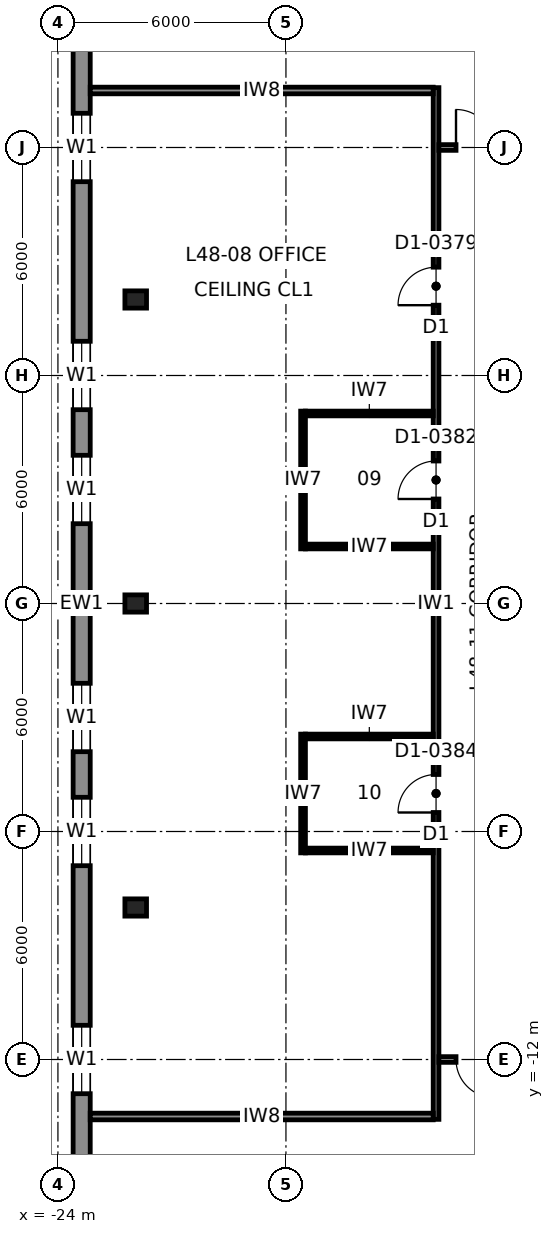
"""IFC4 building model, lengths in metres.
Left out: names, types, materials, properties, quantities, classifications, styles, units other than length and angle.
Written with IfcOpenShell. Run it as: python <this file> out.ifc"""

import sys

from ifc_helpers import new_model, si_unit, direction, frame, frame_2d, origin, origin_2d, place, context, subcontext, project, spatial, rectangle, i_section, extrude, element, fill, save


model = new_model("IFC4")
c1 = context("Model", 3, precision=1e-05, world=origin(), true_north=direction((0.0, 1.0)))
c2 = subcontext(c1, "Body", "Model", "MODEL_VIEW")
j1 = project(units=[si_unit("LENGTHUNIT", "METRE"), si_unit("PLANEANGLEUNIT", "RADIAN")], contexts=[c1])
p1 = place(None, origin())
s1 = spatial("IfcSite", under=j1, at=p1, CompositionType="ELEMENT")
p2 = place(p1, origin())
s2 = spatial("IfcBuilding", under=s1, at=p2, CompositionType="ELEMENT")
p3 = place(p2, frame((0.0, 0.0, 221.8)))
s3 = spatial("IfcBuildingStorey", under=s2, at=p3, CompositionType="ELEMENT", Elevation=221.8)
for number, where, z_axis, x_axis in (
    (1, (-21.953, 0.0, 0.0), (0.04, 0.0, 0.999), (0.0, 1.0, 0.0)),
    (2, (-21.953, 8.0, 0.0), (0.04, 0.0, 0.999), (0.0, 1.0, 0.0)),
    (3, (-21.953, -8.0, 0.0), (0.04, 0.0, 0.999), (0.0, 1.0, 0.0)),
):
    element("IfcColumn", number, at=place(p3, frame(where, z_axis=z_axis, x_axis=x_axis)), inside=s3, PredefinedType="COLUMN", context=c2, shape_type="SweptSolid", body=[
        extrude(i_section(OverallWidth=0.454, OverallDepth=0.569, WebThickness=0.078, FlangeThickness=0.125, at=origin_2d()), origin(), (0.0, 0.0, 1.0), 4.003),
    ])
p4 = place(p3, frame((-23.375, 19.1, 0.0), z_axis=(0.0, 0.0, 1.0), x_axis=(0.0, -1.0, 0.0)))
e4 = element("IfcWall", 4, at=p4, inside=s3, PredefinedType="SOLIDWALL", context=c2, shape_type="SweptSolid", body=[
    extrude(rectangle(XDim=38.2, YDim=0.45, at=frame_2d((19.1, 0.0))), origin(), (0.0, 0.0, 1.0), 3.83),
])
p5 = place(p4, frame((6.2, 0.0, 0.7)))
e5 = element("IfcOpeningElement", 5, at=p5, cuts=e4, PredefinedType="OPENING", context=c2, shape_type="SweptSolid", body=[
    extrude(rectangle(XDim=1.8, YDim=2.6, at=frame_2d((0.9, 1.3))), frame((0.0, 0.235, 0.0), z_axis=(0.0, -1.0, 0.0), x_axis=(1.0, 0.0, 0.0)), (0.0, 0.0, 1.0), 0.47),
])
p6 = place(p4, frame((12.2, 0.0, 0.7)))
e6 = element("IfcOpeningElement", 6, at=p6, cuts=e4, PredefinedType="OPENING", context=c2, shape_type="SweptSolid", body=[
    extrude(rectangle(XDim=1.8, YDim=2.6, at=frame_2d((0.9, 1.3))), frame((0.0, 0.235, 0.0), z_axis=(0.0, -1.0, 0.0), x_axis=(1.0, 0.0, 0.0)), (0.0, 0.0, 1.0), 0.47),
])
p7 = place(p4, frame((15.2, 0.0, 0.7)))
e7 = element("IfcOpeningElement", 7, at=p7, cuts=e4, PredefinedType="OPENING", context=c2, shape_type="SweptSolid", body=[
    extrude(rectangle(XDim=1.8, YDim=2.6, at=frame_2d((0.9, 1.3))), frame((0.0, 0.235, 0.0), z_axis=(0.0, -1.0, 0.0), x_axis=(1.0, 0.0, 0.0)), (0.0, 0.0, 1.0), 0.47),
])
p8 = place(p4, frame((21.2, 0.0, 0.7)))
e8 = element("IfcOpeningElement", 8, at=p8, cuts=e4, PredefinedType="OPENING", context=c2, shape_type="SweptSolid", body=[
    extrude(rectangle(XDim=1.8, YDim=2.6, at=frame_2d((0.9, 1.3))), frame((0.0, 0.235, 0.0), z_axis=(0.0, -1.0, 0.0), x_axis=(1.0, 0.0, 0.0)), (0.0, 0.0, 1.0), 0.47),
])
p9 = place(p4, frame((24.2, 0.0, 0.7)))
e9 = element("IfcOpeningElement", 9, at=p9, cuts=e4, PredefinedType="OPENING", context=c2, shape_type="SweptSolid", body=[
    extrude(rectangle(XDim=1.8, YDim=2.6, at=frame_2d((0.9, 1.3))), frame((0.0, 0.235, 0.0), z_axis=(0.0, -1.0, 0.0), x_axis=(1.0, 0.0, 0.0)), (0.0, 0.0, 1.0), 0.47),
])
p10 = place(p4, frame((30.2, 0.0, 0.7)))
e10 = element("IfcOpeningElement", 10, at=p10, cuts=e4, PredefinedType="OPENING", context=c2, shape_type="SweptSolid", body=[
    extrude(rectangle(XDim=1.8, YDim=2.6, at=frame_2d((0.9, 1.3))), frame((0.0, 0.235, 0.0), z_axis=(0.0, -1.0, 0.0), x_axis=(1.0, 0.0, 0.0)), (0.0, 0.0, 1.0), 0.47),
])
p11 = place(p3, frame((-14.05, 13.575, 0.0), z_axis=(0.0, 0.0, 1.0), x_axis=(0.0, -1.0, 0.0)))
e11 = element("IfcWall", 11, at=p11, inside=s3, PredefinedType="PARTITIONING", context=c2, shape_type="SweptSolid", body=[
    extrude(rectangle(XDim=27.15, YDim=0.15, at=frame_2d((13.575, 0.0))), origin(), (0.0, 0.0, 1.0), 3.83),
])
p12 = place(p11, frame((4.725, 0.0, 0.0)))
e12 = element("IfcOpeningElement", 12, at=p12, cuts=e11, PredefinedType="OPENING", context=c2, shape_type="SweptSolid", body=[
    extrude(rectangle(XDim=1.0, YDim=2.3, at=frame_2d((0.5, 1.15))), frame((0.0, 0.085, 0.0), z_axis=(0.0, -1.0, 0.0), x_axis=(1.0, 0.0, 0.0)), (0.0, 0.0, 1.0), 0.17),
])
p13 = place(p11, frame((9.825, 0.0, 0.0)))
e13 = element("IfcOpeningElement", 13, at=p13, cuts=e11, PredefinedType="OPENING", context=c2, shape_type="SweptSolid", body=[
    extrude(rectangle(XDim=1.0, YDim=2.3, at=frame_2d((0.5, 1.15))), frame((0.0, 0.085, 0.0), z_axis=(0.0, -1.0, 0.0), x_axis=(1.0, 0.0, 0.0)), (0.0, 0.0, 1.0), 0.17),
])
p14 = place(p11, frame((18.075, 0.0, 0.0)))
e14 = element("IfcOpeningElement", 14, at=p14, cuts=e11, PredefinedType="OPENING", context=c2, shape_type="SweptSolid", body=[
    extrude(rectangle(XDim=1.0, YDim=2.3, at=frame_2d((0.5, 1.15))), frame((0.0, 0.085, 0.0), z_axis=(0.0, -1.0, 0.0), x_axis=(1.0, 0.0, 0.0)), (0.0, 0.0, 1.0), 0.17),
])
p15 = place(p3, frame((-13.975, 12.0, 0.0), z_axis=(0.0, 0.0, 1.0), x_axis=(1.0, 0.0, 0.0)))
e15 = element("IfcWall", 15, at=p15, inside=s3, PredefinedType="PARTITIONING", context=c2, shape_type="SweptSolid", body=[
    extrude(rectangle(XDim=1.975, YDim=0.15, at=frame_2d((0.988, 0.0))), origin(), (0.0, 0.0, 1.0), 3.83),
])
p16 = place(p15, frame((0.45, 0.0, 0.0)))
e16 = element("IfcOpeningElement", 16, at=p16, cuts=e15, PredefinedType="OPENING", context=c2, shape_type="SweptSolid", body=[
    extrude(rectangle(XDim=1.0, YDim=2.3, at=frame_2d((0.5, 1.15))), frame((0.0, 0.085, 0.0), z_axis=(0.0, -1.0, 0.0), x_axis=(1.0, 0.0, 0.0)), (0.0, 0.0, 1.0), 0.17),
])
p17 = place(p3, frame((-12.0, -12.0, 0.0), z_axis=(0.0, 0.0, 1.0), x_axis=(-1.0, 0.0, 0.0)))
e17 = element("IfcWall", 17, at=p17, inside=s3, PredefinedType="PARTITIONING", context=c2, shape_type="SweptSolid", body=[
    extrude(rectangle(XDim=1.975, YDim=0.15, at=frame_2d((0.988, 0.0))), origin(), (0.0, 0.0, 1.0), 3.83),
])
p18 = place(p17, frame((0.525, 0.0, 0.0)))
e18 = element("IfcOpeningElement", 18, at=p18, cuts=e17, PredefinedType="OPENING", context=c2, shape_type="SweptSolid", body=[
    extrude(rectangle(XDim=1.0, YDim=2.3, at=frame_2d((0.5, 1.15))), frame((0.0, 0.085, 0.0), z_axis=(0.0, -1.0, 0.0), x_axis=(1.0, 0.0, 0.0)), (0.0, 0.0, 1.0), 0.17),
])
for number, where, z_axis, x_axis in (
    (19, (-23.15, 13.5, 0.0), (0.0, 0.0, 1.0), (1.0, 0.0, 0.0)),
    (20, (-14.125, -13.5, 0.0), (0.0, 0.0, 1.0), (-1.0, 0.0, 0.0)),
):
    element("IfcWall", number, at=place(p3, frame(where, z_axis=z_axis, x_axis=x_axis)), inside=s3, PredefinedType="PARTITIONING", context=c2, shape_type="SweptSolid", body=[
        extrude(rectangle(XDim=9.025, YDim=0.175, at=frame_2d((4.512, 0.0))), origin(), (0.0, 0.0, 1.0), 3.83),
    ])
p19 = place(p3, frame((-17.55, 1.438, 0.0), z_axis=(0.0, 0.0, 1.0), x_axis=(0.0, 1.0, 0.0)))
e21 = element("IfcWall", 21, at=p19, inside=s3, PredefinedType="PARTITIONING", context=c2, shape_type="SweptSolid", body=[
    extrude(rectangle(XDim=3.625, YDim=0.125, at=frame_2d((1.812, 0.0))), origin(), (0.0, 0.0, 1.0), 3.83),
])
for number, where, z_axis, x_axis in (
    (22, (-14.125, 1.5, 0.0), (0.0, 0.0, 1.0), (-1.0, 0.0, 0.0)),
    (23, (-14.125, 5.0, 0.0), (0.0, 0.0, 1.0), (-1.0, 0.0, 0.0)),
):
    element("IfcWall", number, at=place(p3, frame(where, z_axis=z_axis, x_axis=x_axis)), inside=s3, PredefinedType="PARTITIONING", context=c2, shape_type="SweptSolid", body=[
        extrude(rectangle(XDim=3.363, YDim=0.125, at=frame_2d((1.681, 0.0))), origin(), (0.0, 0.0, 1.0), 3.83),
    ])
p20 = place(p3, frame((-17.55, -6.562, 0.0), z_axis=(0.0, 0.0, 1.0), x_axis=(0.0, 1.0, 0.0)))
e24 = element("IfcWall", 24, at=p20, inside=s3, PredefinedType="PARTITIONING", context=c2, shape_type="SweptSolid", body=[
    extrude(rectangle(XDim=3.125, YDim=0.125, at=frame_2d((1.562, 0.0))), origin(), (0.0, 0.0, 1.0), 3.83),
])
for number, where, z_axis, x_axis in (
    (25, (-14.125, -6.5, 0.0), (0.0, 0.0, 1.0), (-1.0, 0.0, 0.0)),
    (26, (-14.125, -3.5, 0.0), (0.0, 0.0, 1.0), (-1.0, 0.0, 0.0)),
):
    element("IfcWall", number, at=place(p3, frame(where, z_axis=z_axis, x_axis=x_axis)), inside=s3, PredefinedType="PARTITIONING", context=c2, shape_type="SweptSolid", body=[
        extrude(rectangle(XDim=3.363, YDim=0.125, at=frame_2d((1.681, 0.0))), origin(), (0.0, 0.0, 1.0), 3.83),
    ])
p21 = place(p5, origin())
e27 = element("IfcWindow", 27, at=p21, inside=s3, PartitioningType="SINGLE_PANEL", PredefinedType="WINDOW", context=c2, shape_type="SweptSolid", body=[
    extrude(rectangle(XDim=1.8, YDim=2.6, at=frame_2d((0.9, 1.3))), frame((0.0, 0.03, 0.0), z_axis=(0.0, -1.0, 0.0), x_axis=(1.0, 0.0, 0.0)), (0.0, 0.0, 1.0), 0.06),
])
fill(e5, e27)
p22 = place(p6, origin())
e28 = element("IfcWindow", 28, at=p22, inside=s3, PartitioningType="SINGLE_PANEL", PredefinedType="WINDOW", context=c2, shape_type="SweptSolid", body=[
    extrude(rectangle(XDim=1.8, YDim=2.6, at=frame_2d((0.9, 1.3))), frame((0.0, 0.03, 0.0), z_axis=(0.0, -1.0, 0.0), x_axis=(1.0, 0.0, 0.0)), (0.0, 0.0, 1.0), 0.06),
])
fill(e6, e28)
p23 = place(p7, origin())
e29 = element("IfcWindow", 29, at=p23, inside=s3, PartitioningType="SINGLE_PANEL", PredefinedType="WINDOW", context=c2, shape_type="SweptSolid", body=[
    extrude(rectangle(XDim=1.8, YDim=2.6, at=frame_2d((0.9, 1.3))), frame((0.0, 0.03, 0.0), z_axis=(0.0, -1.0, 0.0), x_axis=(1.0, 0.0, 0.0)), (0.0, 0.0, 1.0), 0.06),
])
fill(e7, e29)
p24 = place(p8, origin())
e30 = element("IfcWindow", 30, at=p24, inside=s3, PartitioningType="SINGLE_PANEL", PredefinedType="WINDOW", context=c2, shape_type="SweptSolid", body=[
    extrude(rectangle(XDim=1.8, YDim=2.6, at=frame_2d((0.9, 1.3))), frame((0.0, 0.03, 0.0), z_axis=(0.0, -1.0, 0.0), x_axis=(1.0, 0.0, 0.0)), (0.0, 0.0, 1.0), 0.06),
])
fill(e8, e30)
p25 = place(p9, origin())
e31 = element("IfcWindow", 31, at=p25, inside=s3, PartitioningType="SINGLE_PANEL", PredefinedType="WINDOW", context=c2, shape_type="SweptSolid", body=[
    extrude(rectangle(XDim=1.8, YDim=2.6, at=frame_2d((0.9, 1.3))), frame((0.0, 0.03, 0.0), z_axis=(0.0, -1.0, 0.0), x_axis=(1.0, 0.0, 0.0)), (0.0, 0.0, 1.0), 0.06),
])
fill(e9, e31)
p26 = place(p10, origin())
e32 = element("IfcWindow", 32, at=p26, inside=s3, PartitioningType="SINGLE_PANEL", PredefinedType="WINDOW", context=c2, shape_type="SweptSolid", body=[
    extrude(rectangle(XDim=1.8, YDim=2.6, at=frame_2d((0.9, 1.3))), frame((0.0, 0.03, 0.0), z_axis=(0.0, -1.0, 0.0), x_axis=(1.0, 0.0, 0.0)), (0.0, 0.0, 1.0), 0.06),
])
fill(e10, e32)
p27 = place(p16, origin())
e33 = element("IfcDoor", 33, at=p27, inside=s3, OperationType="SINGLE_SWING_LEFT", PredefinedType="DOOR", context=c2, shape_type="SweptSolid", body=[
    extrude(rectangle(XDim=1.0, YDim=2.3, at=frame_2d((0.5, 1.15))), frame((0.0, 0.025, 0.0), z_axis=(0.0, -1.0, 0.0), x_axis=(1.0, 0.0, 0.0)), (0.0, 0.0, 1.0), 0.05),
])
fill(e16, e33)
p28 = place(p18, origin())
e34 = element("IfcDoor", 34, at=p28, inside=s3, OperationType="SINGLE_SWING_LEFT", PredefinedType="DOOR", context=c2, shape_type="SweptSolid", body=[
    extrude(rectangle(XDim=1.0, YDim=2.3, at=frame_2d((0.5, 1.15))), frame((0.0, 0.025, 0.0), z_axis=(0.0, -1.0, 0.0), x_axis=(1.0, 0.0, 0.0)), (0.0, 0.0, 1.0), 0.05),
])
fill(e18, e34)
p29 = place(p12, frame((1.0, 0.0, 0.0), z_axis=(0.0, 0.0, 1.0), x_axis=(-1.0, 0.0, 0.0)))
e35 = element("IfcDoor", 35, at=p29, inside=s3, OperationType="SINGLE_SWING_LEFT", PredefinedType="DOOR", context=c2, shape_type="SweptSolid", body=[
    extrude(rectangle(XDim=1.0, YDim=2.3, at=frame_2d((0.5, 1.15))), frame((0.0, 0.025, 0.0), z_axis=(0.0, -1.0, 0.0), x_axis=(1.0, 0.0, 0.0)), (0.0, 0.0, 1.0), 0.05),
])
fill(e12, e35)
p30 = place(p13, frame((1.0, 0.0, 0.0), z_axis=(0.0, 0.0, 1.0), x_axis=(-1.0, 0.0, 0.0)))
e36 = element("IfcDoor", 36, at=p30, inside=s3, OperationType="SINGLE_SWING_LEFT", PredefinedType="DOOR", context=c2, shape_type="SweptSolid", body=[
    extrude(rectangle(XDim=1.0, YDim=2.3, at=frame_2d((0.5, 1.15))), frame((0.0, 0.025, 0.0), z_axis=(0.0, -1.0, 0.0), x_axis=(1.0, 0.0, 0.0)), (0.0, 0.0, 1.0), 0.05),
])
fill(e13, e36)
p31 = place(p14, frame((1.0, 0.0, 0.0), z_axis=(0.0, 0.0, 1.0), x_axis=(-1.0, 0.0, 0.0)))
e37 = element("IfcDoor", 37, at=p31, inside=s3, OperationType="SINGLE_SWING_LEFT", PredefinedType="DOOR", context=c2, shape_type="SweptSolid", body=[
    extrude(rectangle(XDim=1.0, YDim=2.3, at=frame_2d((0.5, 1.15))), frame((0.0, 0.025, 0.0), z_axis=(0.0, -1.0, 0.0), x_axis=(1.0, 0.0, 0.0)), (0.0, 0.0, 1.0), 0.05),
])
fill(e14, e37)
save(model, sys.argv[1])
